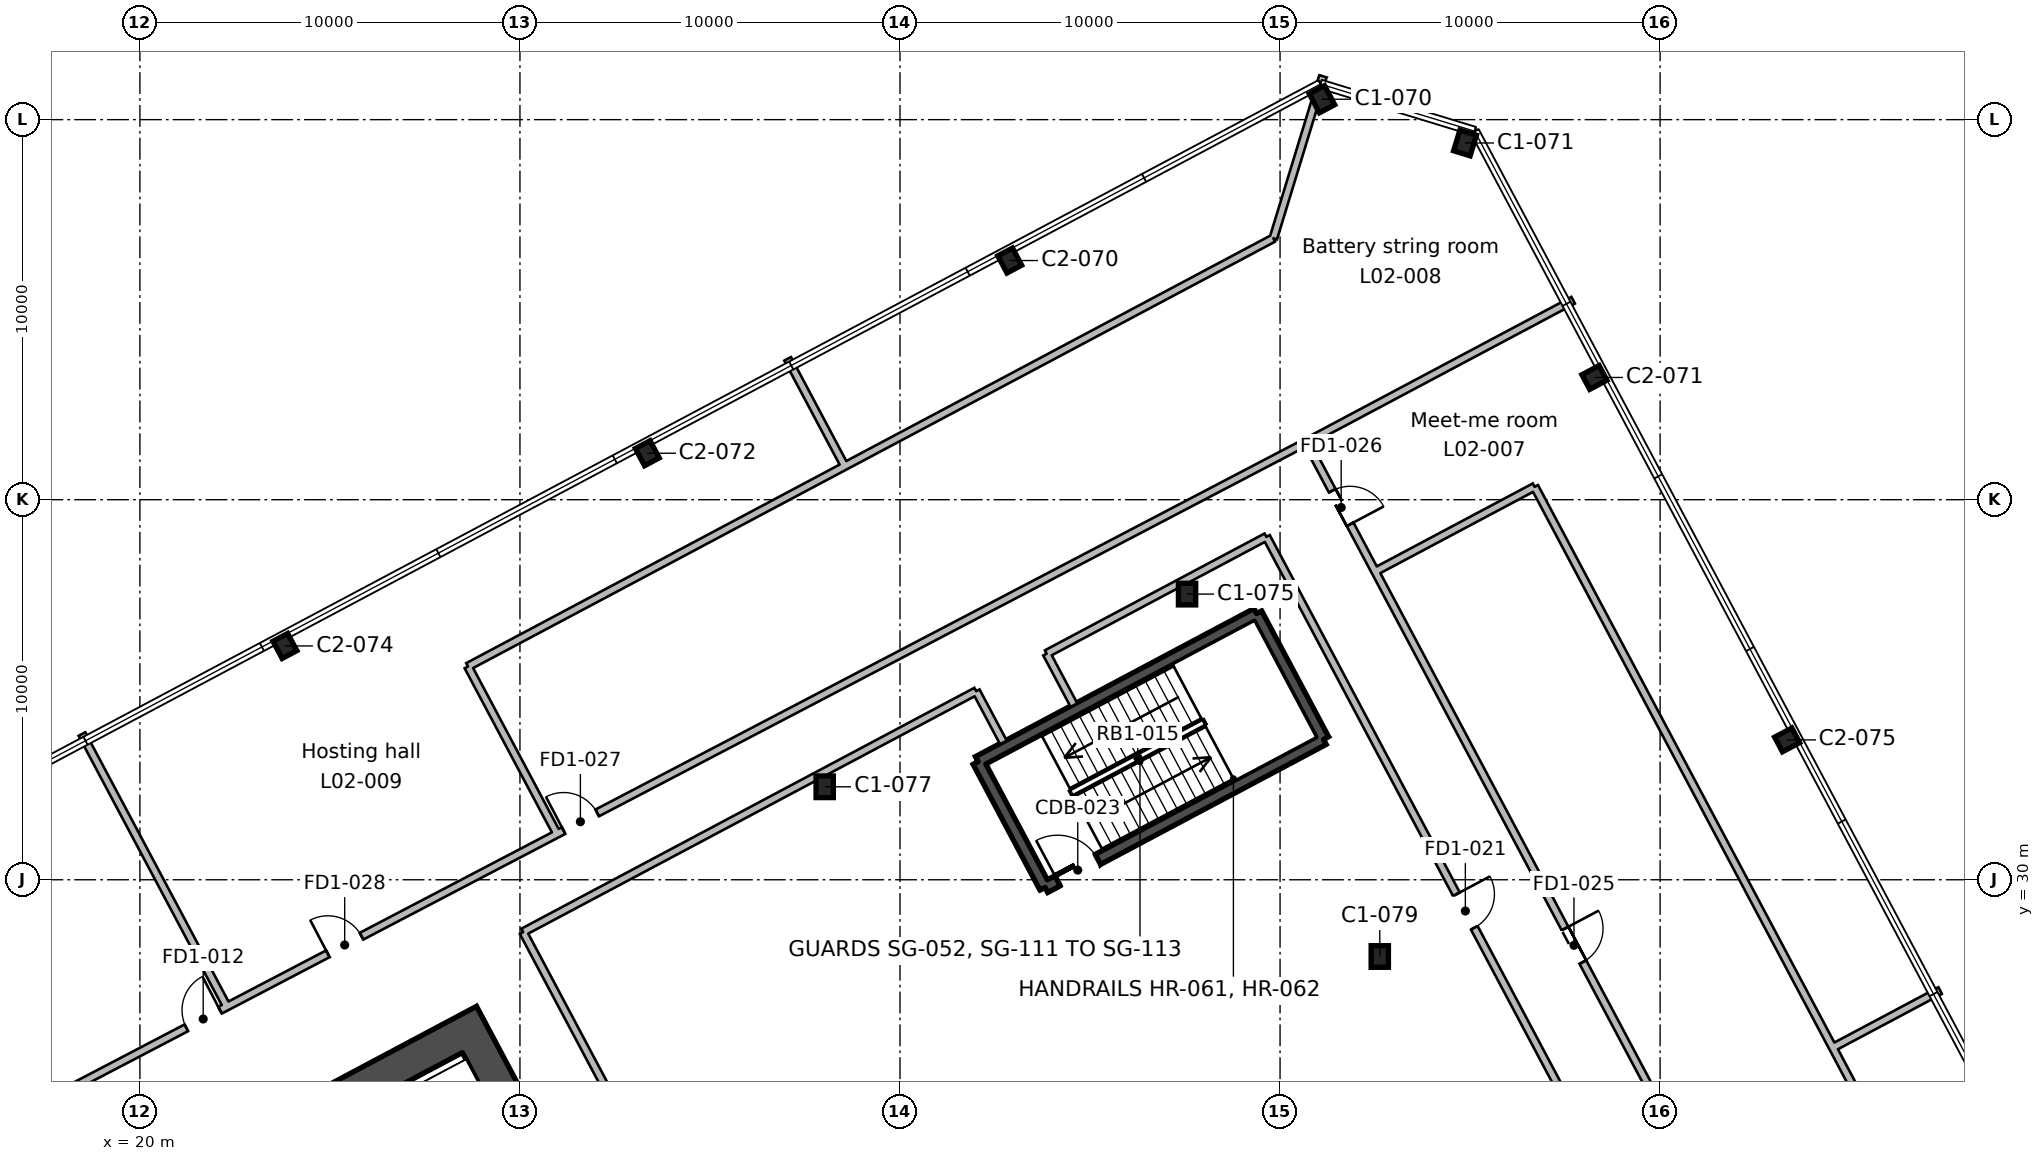
"""IFC4 building model, lengths in metres.
Left out: names, types, materials, properties, quantities, classifications, styles, units other than length and angle.
Written with IfcOpenShell. Run it as: python <this file> out.ifc"""

import sys

from ifc_helpers import new_model, si_unit, direction, frame, frame_2d, origin, origin_2d, place, context, subcontext, project, spatial, rectangle, i_section, extrude, element, fill, save


model = new_model("IFC4")
c1 = context("Model", 3, precision=1e-05, world=origin(), true_north=direction((0.0, 1.0)))
c2 = subcontext(c1, "Body", "Model", "MODEL_VIEW")
j1 = project(units=[si_unit("LENGTHUNIT", "METRE"), si_unit("PLANEANGLEUNIT", "RADIAN")], contexts=[c1])
p1 = place(None, origin())
s1 = spatial("IfcSite", under=j1, at=p1, CompositionType="ELEMENT")
p2 = place(p1, origin())
s2 = spatial("IfcBuilding", under=s1, at=p2, CompositionType="ELEMENT")
p3 = place(p2, frame((0.0, 0.0, 12.2)))
s3 = spatial("IfcBuildingStorey", under=s2, at=p3, CompositionType="ELEMENT", Elevation=12.2)
for number, where, z_axis, x_axis in (
    (1, (52.624, 27.981, 0.0), (0.0, 0.0, 1.0), (1.0, 0.0, 0.0)),
    (2, (38.018, 32.446, 0.0), (0.0, 0.0, 1.0), (1.0, 0.0, 0.0)),
):
    element("IfcColumn", number, at=place(p3, frame(where, z_axis=z_axis, x_axis=x_axis)), inside=s3, PredefinedType="COLUMN", context=c2, shape_type="SweptSolid", body=[
        extrude(i_section(OverallWidth=0.455, OverallDepth=0.569, WebThickness=0.078, FlangeThickness=0.125, FilletRadius=0.015, at=origin_2d()), origin(), (0.0, 0.0, 1.0), 5.4),
    ])
for number, where, z_axis, x_axis in (
    (3, (63.343, 33.68, 0.0), (0.0, 0.0, 1.0), (-0.469, 0.883, 0.0)),
    (4, (23.815, 36.152, 0.0), (0.0, 0.0, 1.0), (-0.883, -0.469, 0.0)),
):
    element("IfcColumn", number, at=place(p3, frame(where, z_axis=z_axis, x_axis=x_axis)), inside=s3, PredefinedType="COLUMN", context=c2, shape_type="SweptSolid", body=[
        extrude(i_section(OverallWidth=0.437, OverallDepth=0.513, WebThickness=0.061, FlangeThickness=0.097, FilletRadius=0.015, at=origin_2d()), origin(), (0.0, 0.0, 1.0), 5.4),
    ])
p4 = place(p3, frame((47.553, 37.516, 0.0), z_axis=(0.0, 0.0, 1.0), x_axis=(1.0, 0.0, 0.0)))
e5 = element("IfcColumn", 5, at=p4, inside=s3, PredefinedType="COLUMN", context=c2, shape_type="SweptSolid", body=[
    extrude(i_section(OverallWidth=0.455, OverallDepth=0.569, WebThickness=0.078, FlangeThickness=0.125, FilletRadius=0.015, at=origin_2d()), origin(), (0.0, 0.0, 1.0), 5.4),
])
for number, where, z_axis, x_axis in (
    (6, (33.351, 41.223, 0.0), (0.0, 0.0, 1.0), (-0.883, -0.469, 0.0)),
    (7, (58.272, 43.216, 0.0), (0.0, 0.0, 1.0), (-0.469, 0.883, 0.0)),
    (8, (42.887, 46.293, 0.0), (0.0, 0.0, 1.0), (-0.883, -0.469, 0.0)),
):
    element("IfcColumn", number, at=place(p3, frame(where, z_axis=z_axis, x_axis=x_axis)), inside=s3, PredefinedType="COLUMN", context=c2, shape_type="SweptSolid", body=[
        extrude(i_section(OverallWidth=0.437, OverallDepth=0.513, WebThickness=0.061, FlangeThickness=0.097, FilletRadius=0.015, at=origin_2d()), origin(), (0.0, 0.0, 1.0), 5.4),
    ])
for number, where, z_axis, x_axis in (
    (9, (54.867, 49.386, 0.0), (0.0, 0.0, 1.0), (-0.956, 0.292, 0.0)),
    (10, (51.103, 50.537, 0.0), (0.0, 0.0, 1.0), (-0.883, -0.469, 0.0)),
):
    element("IfcColumn", number, at=place(p3, frame(where, z_axis=z_axis, x_axis=x_axis)), inside=s3, PredefinedType="COLUMN", context=c2, shape_type="SweptSolid", body=[
        extrude(i_section(OverallWidth=0.455, OverallDepth=0.569, WebThickness=0.078, FlangeThickness=0.125, FilletRadius=0.015, at=origin_2d()), origin(), (0.0, 0.0, 1.0), 5.4),
    ])
p5 = place(p3, frame((37.849, 8.799, 0.0), z_axis=(0.0, 0.0, 1.0), x_axis=(-0.469465789982, 0.882950662289, 0.0)))
e11 = element("IfcWall", 11, at=p5, inside=s3, PredefinedType="SHEAR", context=c2, shape_type="SweptSolid", body=[
    extrude(rectangle(XDim=20.0, YDim=0.9, at=frame_2d((10.0, 0.0))), origin(), (0.0, 0.0, 1.0), 5.4),
])
p6 = place(p5, frame((10.6, 0.0, 0.0)))
e12 = element("IfcOpeningElement", 12, at=p6, cuts=e11, PredefinedType="OPENING", context=c2, shape_type="SweptSolid", body=[
    extrude(rectangle(XDim=2.4, YDim=2.4, at=frame_2d((1.2, 1.2))), frame((0.0, 0.46, 0.0), z_axis=(0.0, -1.0, 0.0), x_axis=(1.0, 0.0, 0.0)), (0.0, 0.0, 1.0), 0.92),
])
p7 = place(p3, frame((10.438, 16.366, 0.0), z_axis=(0.0, 0.0, 1.0), x_axis=(0.88294509198, 0.469476266226, 0.0)))
e13 = element("IfcWall", 13, at=p7, inside=s3, PredefinedType="SHEAR", context=c2, shape_type="SweptSolid", body=[
    extrude(rectangle(XDim=20.2, YDim=0.9, at=frame_2d((10.1, 0.0))), origin(), (0.0, 0.0, 1.0), 5.4),
])
p8 = place(p3, frame((49.384, 37.004, 0.0), z_axis=(0.0, 0.0, 1.0), x_axis=(0.46946936446, -0.882948761726, 0.0)))
e14 = element("IfcWall", 14, at=p8, inside=s3, PredefinedType="SHEAR", context=c2, shape_type="SweptSolid", body=[
    extrude(rectangle(XDim=3.75, YDim=0.3, at=frame_2d((1.875, 0.0))), origin(), (0.0, 0.0, 1.0), 5.4),
])
p9 = place(p3, frame((51.145, 33.693, 0.0), z_axis=(0.0, 0.0, 1.0), x_axis=(-0.882945809314, -0.469474917132, 0.0)))
e15 = element("IfcWall", 15, at=p9, inside=s3, PredefinedType="SHEAR", context=c2, shape_type="SweptSolid", body=[
    extrude(rectangle(XDim=8.3, YDim=0.3, at=frame_2d((4.15, 0.0))), origin(), (0.0, 0.0, 1.0), 5.4),
])
p10 = place(p9, frame((6.725, 0.0, 0.0)))
e16 = element("IfcOpeningElement", 16, at=p10, cuts=e15, PredefinedType="OPENING", context=c2, shape_type="SweptSolid", body=[
    extrude(rectangle(XDim=1.2, YDim=2.1, at=frame_2d((0.6, 1.05))), frame((0.0, 0.16, 0.0), z_axis=(0.0, -1.0, 0.0), x_axis=(1.0, 0.0, 0.0)), (0.0, 0.0, 1.0), 0.32),
])
p11 = place(p3, frame((43.816, 29.796, 0.0), z_axis=(0.0, 0.0, 1.0), x_axis=(-0.46946936446, 0.882948761726, 0.0)))
e17 = element("IfcWall", 17, at=p11, inside=s3, PredefinedType="SHEAR", context=c2, shape_type="SweptSolid", body=[
    extrude(rectangle(XDim=3.75, YDim=0.3, at=frame_2d((1.875, 0.0))), origin(), (0.0, 0.0, 1.0), 5.4),
])
p12 = place(p3, frame((42.055, 33.107, 0.0), z_axis=(0.0, 0.0, 1.0), x_axis=(0.882945809314, 0.469474917132, 0.0)))
e18 = element("IfcWall", 18, at=p12, inside=s3, PredefinedType="SHEAR", context=c2, shape_type="SweptSolid", body=[
    extrude(rectangle(XDim=8.3, YDim=0.3, at=frame_2d((4.15, 0.0))), origin(), (0.0, 0.0, 1.0), 5.4),
])
p13 = place(p3, frame((0.0, 15.007, 0.0), z_axis=(0.0, 0.0, 1.0), x_axis=(0.886151087154, 0.463396429352, 0.0)))
e19 = element("IfcWall", 19, at=p13, inside=s3, PredefinedType="PARTITIONING", context=c2, shape_type="SweptSolid", body=[
    extrude(rectangle(XDim=57.206, YDim=0.2, at=frame_2d((28.603, 0.0))), origin(), (0.0, 0.0, 1.0), 4.95),
])
p14 = place(p13, frame((35.149, 0.0, 0.0)))
e20 = element("IfcOpeningElement", 20, at=p14, cuts=e19, PredefinedType="OPENING", context=c2, shape_type="SweptSolid", body=[
    extrude(rectangle(XDim=1.0, YDim=2.1, at=frame_2d((0.5, 1.05))), frame((0.0, 0.11, 0.0), z_axis=(0.0, -1.0, 0.0), x_axis=(1.0, 0.0, 0.0)), (0.0, 0.0, 1.0), 0.22),
])
p15 = place(p13, frame((28.15, 0.0, 0.0)))
e21 = element("IfcOpeningElement", 21, at=p15, cuts=e19, PredefinedType="OPENING", context=c2, shape_type="SweptSolid", body=[
    extrude(rectangle(XDim=1.0, YDim=2.1, at=frame_2d((0.5, 1.05))), frame((0.0, 0.11, 0.0), z_axis=(0.0, -1.0, 0.0), x_axis=(1.0, 0.0, 0.0)), (0.0, 0.0, 1.0), 0.22),
])
p16 = place(p13, frame((23.949, 0.0, 0.0)))
e22 = element("IfcOpeningElement", 22, at=p16, cuts=e19, PredefinedType="OPENING", context=c2, shape_type="SweptSolid", body=[
    extrude(rectangle(XDim=1.0, YDim=2.1, at=frame_2d((0.5, 1.05))), frame((0.0, 0.11, 0.0), z_axis=(0.0, -1.0, 0.0), x_axis=(1.0, 0.0, 0.0)), (0.0, 0.0, 1.0), 0.22),
])
p17 = place(p13, frame((8.25, 0.0, 0.0)))
e23 = element("IfcOpeningElement", 23, at=p17, cuts=e19, PredefinedType="OPENING", context=c2, shape_type="SweptSolid", body=[
    extrude(rectangle(XDim=0.95, YDim=2.1, at=frame_2d((0.475, 1.05))), frame((0.0, 0.11, 0.0), z_axis=(0.0, -1.0, 0.0), x_axis=(1.0, 0.0, 0.0)), (0.0, 0.0, 1.0), 0.22),
])
p18 = place(p3, frame((18.475, 33.834, 0.0), z_axis=(0.0, 0.0, 1.0), x_axis=(0.469545336722, -0.882908362608, 0.0)))
e24 = element("IfcWall", 24, at=p18, inside=s3, PredefinedType="PARTITIONING", context=c2, shape_type="SweptSolid", body=[
    extrude(rectangle(XDim=8.022, YDim=0.2, at=frame_2d((4.011, 0.0))), origin(), (0.0, 0.0, 1.0), 4.95),
])
p19 = place(p3, frame((30.929, 31.294, 0.0), z_axis=(0.0, 0.0, 1.0), x_axis=(-0.469522706503, 0.882920397362, 0.0)))
e25 = element("IfcWall", 25, at=p19, inside=s3, PredefinedType="PARTITIONING", context=c2, shape_type="SweptSolid", body=[
    extrude(rectangle(XDim=4.889, YDim=0.2, at=frame_2d((2.445, 0.0))), origin(), (0.0, 0.0, 1.0), 4.95),
])
p20 = place(p3, frame((28.633, 35.611, 0.0), z_axis=(0.0, 0.0, 1.0), x_axis=(0.882938561172, 0.469488548524, 0.0)))
e26 = element("IfcWall", 26, at=p20, inside=s3, PredefinedType="PARTITIONING", context=c2, shape_type="SweptSolid", body=[
    extrude(rectangle(XDim=11.227, YDim=0.2, at=frame_2d((5.614, 0.0))), origin(), (0.0, 0.0, 1.0), 4.95),
])
p21 = place(p3, frame((37.044, 43.707, 0.0), z_axis=(0.0, 0.0, 1.0), x_axis=(0.469447181805, -0.882960556025, 0.0)))
e27 = element("IfcWall", 27, at=p21, inside=s3, PredefinedType="PARTITIONING", context=c2, shape_type="SweptSolid", body=[
    extrude(rectangle(XDim=3.199, YDim=0.2, at=frame_2d((1.6, 0.0))), origin(), (0.0, 0.0, 1.0), 4.95),
])
p22 = place(p3, frame((38.546, 40.882, 0.0), z_axis=(0.0, 0.0, 1.0), x_axis=(0.882973874067, 0.469422131685, 0.0)))
e28 = element("IfcWall", 28, at=p22, inside=s3, PredefinedType="PARTITIONING", context=c2, shape_type="SweptSolid", body=[
    extrude(rectangle(XDim=12.773, YDim=0.2, at=frame_2d((6.386, 0.0))), origin(), (0.0, 0.0, 1.0), 4.95),
])
p23 = place(p3, frame((49.824, 46.878, 0.0), z_axis=(0.0, 0.0, 1.0), x_axis=(0.29242717897, 0.956287794024, 0.0)))
e29 = element("IfcWall", 29, at=p23, inside=s3, PredefinedType="PARTITIONING", context=c2, shape_type="SweptSolid", body=[
    extrude(rectangle(XDim=4.459, YDim=0.2, at=frame_2d((2.229, 0.0))), origin(), (0.0, 0.0, 1.0), 4.95),
])
p24 = place(p3, frame((44.577, 34.595, 0.0), z_axis=(0.0, 0.0, 1.0), x_axis=(-0.469512532402, 0.882925807708, 0.0)))
e30 = element("IfcWall", 30, at=p24, inside=s3, PredefinedType="PARTITIONING", context=c2, shape_type="SweptSolid", body=[
    extrude(rectangle(XDim=1.532, YDim=0.2, at=frame_2d((0.766, 0.0))), origin(), (0.0, 0.0, 1.0), 4.95),
])
p25 = place(p3, frame((43.858, 35.948, 0.0), z_axis=(0.0, 0.0, 1.0), x_axis=(0.882949648076, 0.469467697464, 0.0)))
e31 = element("IfcWall", 31, at=p25, inside=s3, PredefinedType="PARTITIONING", context=c2, shape_type="SweptSolid", body=[
    extrude(rectangle(XDim=6.55, YDim=0.2, at=frame_2d((3.275, 0.0))), origin(), (0.0, 0.0, 1.0), 4.95),
])
p26 = place(p3, frame((49.641, 39.023, 0.0), z_axis=(0.0, 0.0, 1.0), x_axis=(0.469459906809, -0.882953790353, 0.0)))
e32 = element("IfcWall", 32, at=p26, inside=s3, PredefinedType="PARTITIONING", context=c2, shape_type="SweptSolid", body=[
    extrude(rectangle(XDim=22.3, YDim=0.2, at=frame_2d((11.15, 0.0))), origin(), (0.0, 0.0, 1.0), 4.95),
])
p27 = place(p26, frame((10.65, 0.0, 0.0)))
e33 = element("IfcOpeningElement", 33, at=p27, cuts=e32, PredefinedType="OPENING", context=c2, shape_type="SweptSolid", body=[
    extrude(rectangle(XDim=1.0, YDim=2.1, at=frame_2d((0.5, 1.05))), frame((0.0, 0.11, 0.0), z_axis=(0.0, -1.0, 0.0), x_axis=(1.0, 0.0, 0.0)), (0.0, 0.0, 1.0), 0.22),
])
p28 = place(p3, frame((40.553, 8.934, 0.0), z_axis=(0.0, 0.0, 1.0), x_axis=(-0.46949404623, 0.882935637832, 0.0)))
e34 = element("IfcWall", 34, at=p28, inside=s3, PredefinedType="PARTITIONING", context=c2, shape_type="SweptSolid", body=[
    extrude(rectangle(XDim=22.301, YDim=0.2, at=frame_2d((11.15, 0.0))), origin(), (0.0, 0.0, 1.0), 4.95),
])
p29 = place(p3, frame((30.083, 28.624, 0.0), z_axis=(0.0, 0.0, 1.0), x_axis=(0.882964893563, 0.469439023448, 0.0)))
e35 = element("IfcWall", 35, at=p29, inside=s3, PredefinedType="PARTITIONING", context=c2, shape_type="SweptSolid", body=[
    extrude(rectangle(XDim=13.501, YDim=0.2, at=frame_2d((6.75, 0.0))), origin(), (0.0, 0.0, 1.0), 4.95),
])
p30 = place(p3, frame((42.004, 34.962, 0.0), z_axis=(0.0, 0.0, 1.0), x_axis=(0.469583805178, -0.882887903369, 0.0)))
e36 = element("IfcWall", 36, at=p30, inside=s3, PredefinedType="PARTITIONING", context=c2, shape_type="SweptSolid", body=[
    extrude(rectangle(XDim=1.527, YDim=0.2, at=frame_2d((0.763, 0.0))), origin(), (0.0, 0.0, 1.0), 4.95),
])
p31 = place(p3, frame((52.545, 38.033, 0.0), z_axis=(0.0, 0.0, 1.0), x_axis=(0.469474673387, -0.882945938916, 0.0)))
e37 = element("IfcWall", 37, at=p31, inside=s3, PredefinedType="PARTITIONING", context=c2, shape_type="SweptSolid", body=[
    extrude(rectangle(XDim=22.163, YDim=0.2, at=frame_2d((11.082, 0.0))), origin(), (0.0, 0.0, 1.0), 4.95),
])
p32 = place(p31, frame((10.551, 0.0, 0.0)))
e38 = element("IfcOpeningElement", 38, at=p32, cuts=e37, PredefinedType="OPENING", context=c2, shape_type="SweptSolid", body=[
    extrude(rectangle(XDim=1.0, YDim=2.1, at=frame_2d((0.5, 1.05))), frame((0.0, 0.11, 0.0), z_axis=(0.0, -1.0, 0.0), x_axis=(1.0, 0.0, 0.0)), (0.0, 0.0, 1.0), 0.22),
])
p33 = place(p3, frame((50.693, 41.516, 0.0), z_axis=(0.0, 0.0, 1.0), x_axis=(0.469428212836, -0.882970641071, 0.0)))
e39 = element("IfcWall", 39, at=p33, inside=s3, PredefinedType="PARTITIONING", context=c2, shape_type="SweptSolid", body=[
    extrude(rectangle(XDim=3.945, YDim=0.2, at=frame_2d((1.972, 0.0))), origin(), (0.0, 0.0, 1.0), 4.95),
])
p34 = place(p33, frame((1.45, 0.0, 0.0)))
e40 = element("IfcOpeningElement", 40, at=p34, cuts=e39, PredefinedType="OPENING", context=c2, shape_type="SweptSolid", body=[
    extrude(rectangle(XDim=1.0, YDim=2.1, at=frame_2d((0.5, 1.05))), frame((0.0, 0.11, 0.0), z_axis=(0.0, -1.0, 0.0), x_axis=(1.0, 0.0, 0.0)), (0.0, 0.0, 1.0), 0.22),
])
p35 = place(p3, frame((57.713, 45.248, 0.0), z_axis=(0.0, 0.0, 1.0), x_axis=(-0.882976121624, -0.46941790405, 0.0)))
e41 = element("IfcWall", 41, at=p35, inside=s3, PredefinedType="PARTITIONING", context=c2, shape_type="SweptSolid", body=[
    extrude(rectangle(XDim=7.95, YDim=0.2, at=frame_2d((3.975, 0.0))), origin(), (0.0, 0.0, 1.0), 4.95),
])
p36 = place(p3, frame((52.52, 38.118, 0.0), z_axis=(0.0, 0.0, 1.0), x_axis=(0.882886497292, 0.469586448802, 0.0)))
e42 = element("IfcWall", 42, at=p36, inside=s3, PredefinedType="PARTITIONING", context=c2, shape_type="SweptSolid", body=[
    extrude(rectangle(XDim=4.732, YDim=0.2, at=frame_2d((2.366, 0.0))), origin(), (0.0, 0.0, 1.0), 4.95),
])
p37 = place(p3, frame((56.698, 40.34, 0.0), z_axis=(0.0, 0.0, 1.0), x_axis=(0.469433248113, -0.882967964065, 0.0)))
e43 = element("IfcWall", 43, at=p37, inside=s3, PredefinedType="PARTITIONING", context=c2, shape_type="SweptSolid", body=[
    extrude(rectangle(XDim=14.509, YDim=0.2, at=frame_2d((7.254, 0.0))), origin(), (0.0, 0.0, 1.0), 4.95),
])
p38 = place(p3, frame((63.509, 27.529, 0.0), z_axis=(0.0, 0.0, 1.0), x_axis=(0.469480983661, -0.882942583627, 0.0)))
e44 = element("IfcWall", 44, at=p38, inside=s3, PredefinedType="PARTITIONING", context=c2, shape_type="SweptSolid", body=[
    extrude(rectangle(XDim=15.707, YDim=0.2, at=frame_2d((7.854, 0.0))), origin(), (0.0, 0.0, 1.0), 4.95),
])
p39 = place(p3, frame((67.37, 27.085, 0.0), z_axis=(0.0, 0.0, 1.0), x_axis=(-0.882918137105, -0.469526956809, 0.0)))
e45 = element("IfcWall", 45, at=p39, inside=s3, PredefinedType="PARTITIONING", context=c2, shape_type="SweptSolid", body=[
    extrude(rectangle(XDim=3.201, YDim=0.2, at=frame_2d((1.601, 0.0))), origin(), (0.0, 0.0, 1.0), 4.95),
])
p40 = place(p10, frame((1.2, 0.0, 0.0), z_axis=(0.0, 0.0, 1.0), x_axis=(-1.0, 0.0, 0.0)))
e46 = element("IfcDoor", 46, at=p40, inside=s3, OperationType="SINGLE_SWING_LEFT", PredefinedType="DOOR", context=c2, shape_type="SweptSolid", body=[
    extrude(rectangle(XDim=1.2, YDim=2.1, at=frame_2d((0.6, 1.05))), frame((0.0, 0.025, 0.0), z_axis=(0.0, -1.0, 0.0), x_axis=(1.0, 0.0, 0.0)), (0.0, 0.0, 1.0), 0.05),
])
fill(e16, e46)
p41 = place(p32, origin())
e47 = element("IfcDoor", 47, at=p41, inside=s3, OperationType="SINGLE_SWING_LEFT", PredefinedType="DOOR", context=c2, shape_type="SweptSolid", body=[
    extrude(rectangle(XDim=1.0, YDim=2.1, at=frame_2d((0.5, 1.05))), frame((0.0, 0.025, 0.0), z_axis=(0.0, -1.0, 0.0), x_axis=(1.0, 0.0, 0.0)), (0.0, 0.0, 1.0), 0.05),
])
fill(e38, e47)
p42 = place(p34, origin())
e48 = element("IfcDoor", 48, at=p42, inside=s3, OperationType="SINGLE_SWING_RIGHT", PredefinedType="DOOR", context=c2, shape_type="SweptSolid", body=[
    extrude(rectangle(XDim=1.0, YDim=2.1, at=frame_2d((0.5, 1.05))), frame((0.0, 0.025, 0.0), z_axis=(0.0, -1.0, 0.0), x_axis=(1.0, 0.0, 0.0)), (0.0, 0.0, 1.0), 0.05),
])
fill(e40, e48)
p43 = place(p14, origin())
e49 = element("IfcDoor", 49, at=p43, inside=s3, OperationType="SINGLE_SWING_LEFT", PredefinedType="DOOR", context=c2, shape_type="SweptSolid", body=[
    extrude(rectangle(XDim=1.0, YDim=2.1, at=frame_2d((0.5, 1.05))), frame((0.0, 0.025, 0.0), z_axis=(0.0, -1.0, 0.0), x_axis=(1.0, 0.0, 0.0)), (0.0, 0.0, 1.0), 0.05),
])
fill(e20, e49)
p44 = place(p15, origin())
e50 = element("IfcDoor", 50, at=p44, inside=s3, OperationType="SINGLE_SWING_LEFT", PredefinedType="DOOR", context=c2, shape_type="SweptSolid", body=[
    extrude(rectangle(XDim=1.0, YDim=2.1, at=frame_2d((0.5, 1.05))), frame((0.0, 0.025, 0.0), z_axis=(0.0, -1.0, 0.0), x_axis=(1.0, 0.0, 0.0)), (0.0, 0.0, 1.0), 0.05),
])
fill(e21, e50)
p45 = place(p16, origin())
e51 = element("IfcDoor", 51, at=p45, inside=s3, OperationType="SINGLE_SWING_RIGHT", PredefinedType="DOOR", context=c2, shape_type="SweptSolid", body=[
    extrude(rectangle(XDim=1.0, YDim=2.1, at=frame_2d((0.5, 1.05))), frame((0.0, 0.025, 0.0), z_axis=(0.0, -1.0, 0.0), x_axis=(1.0, 0.0, 0.0)), (0.0, 0.0, 1.0), 0.05),
])
fill(e22, e51)
p46 = place(p27, origin())
e52 = element("IfcDoor", 52, at=p46, inside=s3, OperationType="SINGLE_SWING_LEFT", PredefinedType="DOOR", context=c2, shape_type="SweptSolid", body=[
    extrude(rectangle(XDim=1.0, YDim=2.1, at=frame_2d((0.5, 1.05))), frame((0.0, 0.025, 0.0), z_axis=(0.0, -1.0, 0.0), x_axis=(1.0, 0.0, 0.0)), (0.0, 0.0, 1.0), 0.05),
])
fill(e33, e52)
save(model, sys.argv[1])
